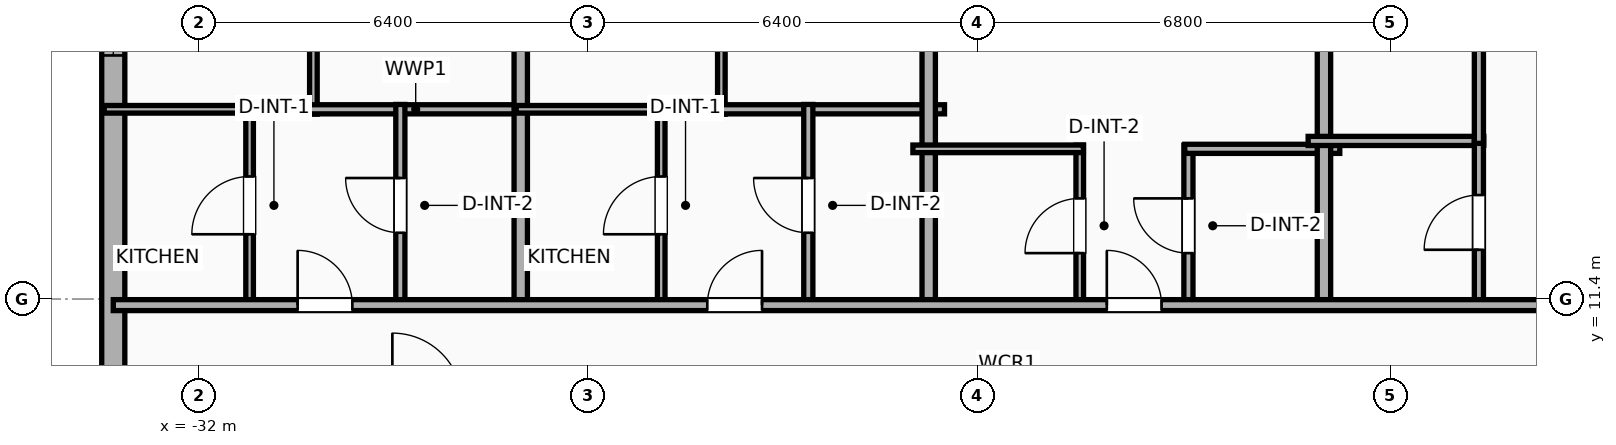
"""IFC4 building model, lengths in metres.
Left out: names, types, materials, properties, quantities, classifications, styles, units other than length and angle.
Written with IfcOpenShell. Run it as: python <this file> out.ifc"""

import sys

from ifc_helpers import new_model, si_unit, direction, frame, frame_2d, origin, place, context, subcontext, project, spatial, rectangle, extrude, element, fill, save


model = new_model("IFC4")
c1 = context("Model", 3, precision=1e-05, world=origin(), true_north=direction((0.0, 1.0)))
c2 = subcontext(c1, "Body", "Model", "MODEL_VIEW")
j1 = project(units=[si_unit("LENGTHUNIT", "METRE"), si_unit("PLANEANGLEUNIT", "RADIAN")], contexts=[c1])
p1 = place(None, origin())
s1 = spatial("IfcSite", under=j1, at=p1, CompositionType="ELEMENT")
p2 = place(p1, origin())
s2 = spatial("IfcBuilding", under=s1, at=p2, CompositionType="ELEMENT")
p3 = place(p2, frame((0.0, 0.0, 49.4)))
s3 = spatial("IfcBuildingStorey", under=s2, at=p3, CompositionType="ELEMENT", Elevation=49.4)
p4 = place(p3, frame((-33.41, -18.381, 0.0), z_axis=(0.0, 0.0, 1.0), x_axis=(0.0, 1.0, 0.0)))
e1 = element("IfcWall", 1, at=p4, inside=s3, PredefinedType="ELEMENTEDWALL", context=c2, shape_type="SweptSolid", body=[
    extrude(rectangle(XDim=36.763, YDim=0.38, at=frame_2d((18.381, 0.0))), origin(), (0.0, 0.0, 1.0), 3.65),
])
p5 = place(p4, frame((33.787, 0.0, 0.75)))
e2 = element("IfcOpeningElement", 2, at=p5, cuts=e1, PredefinedType="OPENING", context=c2, shape_type="SweptSolid", body=[
    extrude(rectangle(XDim=1.2, YDim=2.05, at=frame_2d((0.6, 1.025))), frame((0.0, 0.2, 0.0), z_axis=(0.0, -1.0, 0.0), x_axis=(1.0, 0.0, 0.0)), (0.0, 0.0, 1.0), 0.4),
])
p6 = place(p4, frame((22.726, 0.0, 0.75)))
e3 = element("IfcOpeningElement", 3, at=p6, cuts=e1, PredefinedType="OPENING", context=c2, shape_type="SweptSolid", body=[
    extrude(rectangle(XDim=1.2, YDim=2.05, at=frame_2d((0.6, 1.025))), frame((0.0, 0.2, 0.0), z_axis=(0.0, -1.0, 0.0), x_axis=(1.0, 0.0, 0.0)), (0.0, 0.0, 1.0), 0.4),
])
p7 = place(p4, frame((12.976, 0.0, 0.75)))
e4 = element("IfcOpeningElement", 4, at=p7, cuts=e1, PredefinedType="OPENING", context=c2, shape_type="SweptSolid", body=[
    extrude(rectangle(XDim=1.2, YDim=2.05, at=frame_2d((0.6, 1.025))), frame((0.0, 0.2, 0.0), z_axis=(0.0, -1.0, 0.0), x_axis=(1.0, 0.0, 0.0)), (0.0, 0.0, 1.0), 0.4),
])
p8 = place(p3, frame((-30.119, 14.44, 0.0), z_axis=(0.0, 0.0, 1.0), x_axis=(0.0, 1.0, 0.0)))
e5 = element("IfcWall", 5, at=p8, inside=s3, PredefinedType="PARTITIONING", context=c2, shape_type="SweptSolid", body=[
    extrude(rectangle(XDim=7.816, YDim=0.125, at=frame_2d((3.908, 0.0))), origin(), (0.0, 0.0, 1.0), 3.65),
])
p9 = place(p8, frame((1.426, 0.0, 0.0)))
e6 = element("IfcOpeningElement", 6, at=p9, cuts=e5, PredefinedType="OPENING", context=c2, shape_type="SweptSolid", body=[
    extrude(rectangle(XDim=0.9, YDim=2.05, at=frame_2d((0.45, 1.025))), frame((0.0, 0.073, 0.0), z_axis=(0.0, -1.0, 0.0), x_axis=(1.0, 0.0, 0.0)), (0.0, 0.0, 1.0), 0.145),
])
p10 = place(p3, frame((-30.239, 14.52, 0.0), z_axis=(0.0, 0.0, 1.0), x_axis=(1.0, 0.0, 0.0)))
e7 = element("IfcWall", 7, at=p10, inside=s3, PredefinedType="PLUMBINGWALL", context=c2, shape_type="SweptSolid", body=[
    extrude(rectangle(XDim=3.605, YDim=0.15, at=frame_2d((1.802, 0.0))), origin(), (0.0, 0.0, 1.0), 3.65),
])
p11 = place(p3, frame((-31.168, 11.28, 0.0), z_axis=(0.0, 0.0, 1.0), x_axis=(0.0, 1.0, 0.0)))
e8 = element("IfcWall", 8, at=p11, inside=s3, PredefinedType="PARTITIONING", context=c2, shape_type="SweptSolid", body=[
    extrude(rectangle(XDim=3.32, YDim=0.125, at=frame_2d((1.66, 0.0))), origin(), (0.0, 0.0, 1.0), 3.65),
])
p12 = place(p11, frame((1.185, 0.0, 0.0)))
e9 = element("IfcOpeningElement", 9, at=p12, cuts=e8, PredefinedType="OPENING", context=c2, shape_type="SweptSolid", body=[
    extrude(rectangle(XDim=0.95, YDim=2.05, at=frame_2d((0.475, 1.025))), frame((0.0, 0.073, 0.0), z_axis=(0.0, -1.0, 0.0), x_axis=(1.0, 0.0, 0.0)), (0.0, 0.0, 1.0), 0.145),
])
p13 = place(p3, frame((-33.56, 14.52, 0.0), z_axis=(0.0, 0.0, 1.0), x_axis=(1.0, 0.0, 0.0)))
e10 = element("IfcWall", 10, at=p13, inside=s3, PredefinedType="PARTITIONING", context=c2, shape_type="SweptSolid", body=[
    extrude(rectangle(XDim=2.512, YDim=0.125, at=frame_2d((1.256, 0.0))), origin(), (0.0, 0.0, 1.0), 3.65),
])
p14 = place(p3, frame((-28.689, 11.28, 0.0), z_axis=(0.0, 0.0, 1.0), x_axis=(0.0, 1.0, 0.0)))
e11 = element("IfcWall", 11, at=p14, inside=s3, PredefinedType="PLUMBINGWALL", context=c2, shape_type="SweptSolid", body=[
    extrude(rectangle(XDim=3.32, YDim=0.15, at=frame_2d((1.66, 0.0))), origin(), (0.0, 0.0, 1.0), 3.65),
])
p15 = place(p14, frame((1.21, 0.0, 0.0)))
e12 = element("IfcOpeningElement", 12, at=p15, cuts=e11, PredefinedType="OPENING", context=c2, shape_type="SweptSolid", body=[
    extrude(rectangle(XDim=0.9, YDim=2.05, at=frame_2d((0.45, 1.025))), frame((0.0, 0.085, 0.0), z_axis=(0.0, -1.0, 0.0), x_axis=(1.0, 0.0, 0.0)), (0.0, 0.0, 1.0), 0.17),
])
p16 = place(p3, frame((-26.709, 11.22, 0.0), z_axis=(0.0, 0.0, 1.0), x_axis=(0.0, 1.0, 0.0)))
e13 = element("IfcWall", 13, at=p16, inside=s3, PredefinedType="PARTITIONING", context=c2, shape_type="SweptSolid", body=[
    extrude(rectangle(XDim=10.99, YDim=0.22, at=frame_2d((5.495, 0.0))), origin(), (0.0, 0.0, 1.0), 3.65),
])
p17 = place(p3, frame((-23.41, 14.44, 0.0), z_axis=(0.0, 0.0, 1.0), x_axis=(0.0, 1.0, 0.0)))
e14 = element("IfcWall", 14, at=p17, inside=s3, PredefinedType="PARTITIONING", context=c2, shape_type="SweptSolid", body=[
    extrude(rectangle(XDim=7.92, YDim=0.125, at=frame_2d((3.96, 0.0))), origin(), (0.0, 0.0, 1.0), 3.65),
])
p18 = place(p17, frame((1.451, 0.0, 0.0)))
e15 = element("IfcOpeningElement", 15, at=p18, cuts=e14, PredefinedType="OPENING", context=c2, shape_type="SweptSolid", body=[
    extrude(rectangle(XDim=0.9, YDim=2.05, at=frame_2d((0.45, 1.025))), frame((0.0, 0.073, 0.0), z_axis=(0.0, -1.0, 0.0), x_axis=(1.0, 0.0, 0.0)), (0.0, 0.0, 1.0), 0.145),
])
p19 = place(p3, frame((-23.53, 14.52, 0.0), z_axis=(0.0, 0.0, 1.0), x_axis=(1.0, 0.0, 0.0)))
e16 = element("IfcWall", 16, at=p19, inside=s3, PredefinedType="PLUMBINGWALL", context=c2, shape_type="SweptSolid", body=[
    extrude(rectangle(XDim=3.79, YDim=0.15, at=frame_2d((1.895, 0.0))), origin(), (0.0, 0.0, 1.0), 3.65),
])
p20 = place(p3, frame((-24.399, 11.28, 0.0), z_axis=(0.0, 0.0, 1.0), x_axis=(0.0, 1.0, 0.0)))
e17 = element("IfcWall", 17, at=p20, inside=s3, PredefinedType="PARTITIONING", context=c2, shape_type="SweptSolid", body=[
    extrude(rectangle(XDim=3.32, YDim=0.125, at=frame_2d((1.66, 0.0))), origin(), (0.0, 0.0, 1.0), 3.65),
])
p21 = place(p20, frame((1.185, 0.0, 0.0)))
e18 = element("IfcOpeningElement", 18, at=p21, cuts=e17, PredefinedType="OPENING", context=c2, shape_type="SweptSolid", body=[
    extrude(rectangle(XDim=0.95, YDim=2.05, at=frame_2d((0.475, 1.025))), frame((0.0, 0.073, 0.0), z_axis=(0.0, -1.0, 0.0), x_axis=(1.0, 0.0, 0.0)), (0.0, 0.0, 1.0), 0.145),
])
p22 = place(p3, frame((-26.784, 14.52, 0.0), z_axis=(0.0, 0.0, 1.0), x_axis=(1.0, 0.0, 0.0)))
e19 = element("IfcWall", 19, at=p22, inside=s3, PredefinedType="PARTITIONING", context=c2, shape_type="SweptSolid", body=[
    extrude(rectangle(XDim=2.505, YDim=0.125, at=frame_2d((1.252, 0.0))), origin(), (0.0, 0.0, 1.0), 3.65),
])
p23 = place(p3, frame((-21.98, 11.28, 0.0), z_axis=(0.0, 0.0, 1.0), x_axis=(0.0, 1.0, 0.0)))
e20 = element("IfcWall", 20, at=p23, inside=s3, PredefinedType="PLUMBINGWALL", context=c2, shape_type="SweptSolid", body=[
    extrude(rectangle(XDim=3.32, YDim=0.15, at=frame_2d((1.66, 0.0))), origin(), (0.0, 0.0, 1.0), 3.65),
])
p24 = place(p23, frame((1.21, 0.0, 0.0)))
e21 = element("IfcOpeningElement", 21, at=p24, cuts=e20, PredefinedType="OPENING", context=c2, shape_type="SweptSolid", body=[
    extrude(rectangle(XDim=0.9, YDim=2.05, at=frame_2d((0.45, 1.025))), frame((0.0, 0.085, 0.0), z_axis=(0.0, -1.0, 0.0), x_axis=(1.0, 0.0, 0.0)), (0.0, 0.0, 1.0), 0.17),
])
p25 = place(p3, frame((-20.0, 11.22, 0.0), z_axis=(0.0, 0.0, 1.0), x_axis=(0.0, 1.0, 0.0)))
e22 = element("IfcWall", 22, at=p25, inside=s3, PredefinedType="PARTITIONING", context=c2, shape_type="SweptSolid", body=[
    extrude(rectangle(XDim=10.99, YDim=0.22, at=frame_2d((5.495, 0.0))), origin(), (0.0, 0.0, 1.0), 3.65),
])
p26 = place(p3, frame((-17.516, 11.28, 0.0), z_axis=(0.0, 0.0, 1.0), x_axis=(0.0, 1.0, 0.0)))
e23 = element("IfcWall", 23, at=p26, inside=s3, PredefinedType="PARTITIONING", context=c2, shape_type="SweptSolid", body=[
    extrude(rectangle(XDim=2.65, YDim=0.125, at=frame_2d((1.325, 0.0))), origin(), (0.0, 0.0, 1.0), 3.65),
])
p27 = place(p26, frame((0.875, 0.0, 0.0)))
e24 = element("IfcOpeningElement", 24, at=p27, cuts=e23, PredefinedType="OPENING", context=c2, shape_type="SweptSolid", body=[
    extrude(rectangle(XDim=0.9, YDim=2.05, at=frame_2d((0.45, 1.025))), frame((0.0, 0.073, 0.0), z_axis=(0.0, -1.0, 0.0), x_axis=(1.0, 0.0, 0.0)), (0.0, 0.0, 1.0), 0.145),
])
p28 = place(p3, frame((-15.729, 11.28, 0.0), z_axis=(0.0, 0.0, 1.0), x_axis=(0.0, 1.0, 0.0)))
e25 = element("IfcWall", 25, at=p28, inside=s3, PredefinedType="PLUMBINGWALL", context=c2, shape_type="SweptSolid", body=[
    extrude(rectangle(XDim=2.65, YDim=0.15, at=frame_2d((1.325, 0.0))), origin(), (0.0, 0.0, 1.0), 3.65),
])
p29 = place(p28, frame((0.875, 0.0, 0.0)))
e26 = element("IfcOpeningElement", 26, at=p29, cuts=e25, PredefinedType="OPENING", context=c2, shape_type="SweptSolid", body=[
    extrude(rectangle(XDim=0.9, YDim=2.05, at=frame_2d((0.45, 1.025))), frame((0.0, 0.085, 0.0), z_axis=(0.0, -1.0, 0.0), x_axis=(1.0, 0.0, 0.0)), (0.0, 0.0, 1.0), 0.17),
])
p30 = place(p3, frame((-20.26, 13.87, 0.0), z_axis=(0.0, 0.0, 1.0), x_axis=(1.0, 0.0, 0.0)))
e27 = element("IfcWall", 27, at=p30, inside=s3, PredefinedType="PARTITIONING", context=c2, shape_type="SweptSolid", body=[
    extrude(rectangle(XDim=2.804, YDim=0.125, at=frame_2d((1.402, 0.0))), origin(), (0.0, 0.0, 1.0), 3.65),
])
p31 = place(p3, frame((-15.789, 13.87, 0.0), z_axis=(0.0, 0.0, 1.0), x_axis=(1.0, 0.0, 0.0)))
e28 = element("IfcWall", 28, at=p31, inside=s3, PredefinedType="PLUMBINGWALL", context=c2, shape_type="SweptSolid", body=[
    extrude(rectangle(XDim=2.549, YDim=0.15, at=frame_2d((1.274, 0.0))), origin(), (0.0, 0.0, 1.0), 3.65),
])
p32 = place(p3, frame((-13.5, 11.22, 0.0), z_axis=(0.0, 0.0, 1.0), x_axis=(0.0, 1.0, 0.0)))
e29 = element("IfcWall", 29, at=p32, inside=s3, PredefinedType="PARTITIONING", context=c2, shape_type="SweptSolid", body=[
    extrude(rectangle(XDim=10.99, YDim=0.22, at=frame_2d((5.495, 0.0))), origin(), (0.0, 0.0, 1.0), 3.65),
])
p33 = place(p3, frame((-13.76, 14.0, 0.0), z_axis=(0.0, 0.0, 1.0), x_axis=(1.0, 0.0, 0.0)))
e30 = element("IfcWall", 30, at=p33, inside=s3, PredefinedType="PLUMBINGWALL", context=c2, shape_type="SweptSolid", body=[
    extrude(rectangle(XDim=2.888, YDim=0.15, at=frame_2d((1.444, 0.0))), origin(), (0.0, 0.0, 1.0), 3.65),
])
p34 = place(p3, frame((-10.952, 11.28, 0.0), z_axis=(0.0, 0.0, 1.0), x_axis=(0.0, 1.0, 0.0)))
e31 = element("IfcWall", 31, at=p34, inside=s3, PredefinedType="PLUMBINGWALL", context=c2, shape_type="SweptSolid", body=[
    extrude(rectangle(XDim=2.76, YDim=0.15, at=frame_2d((1.38, 0.0))), origin(), (0.0, 0.0, 1.0), 2.94),
])
p35 = place(p34, frame((0.93, 0.0, 0.0)))
e32 = element("IfcOpeningElement", 32, at=p35, cuts=e31, PredefinedType="OPENING", context=c2, shape_type="SweptSolid", body=[
    extrude(rectangle(XDim=0.9, YDim=2.05, at=frame_2d((0.45, 1.025))), frame((0.0, 0.085, 0.0), z_axis=(0.0, -1.0, 0.0), x_axis=(1.0, 0.0, 0.0)), (0.0, 0.0, 1.0), 0.17),
])
p36 = place(p3, frame((-10.952, 13.96, 0.0), z_axis=(0.0, 0.0, 1.0), x_axis=(0.0, 1.0, 0.0)))
e33 = element("IfcWall", 33, at=p36, inside=s3, PredefinedType="PLUMBINGWALL", context=c2, shape_type="SweptSolid", body=[
    extrude(rectangle(XDim=8.298, YDim=0.15, at=frame_2d((4.149, 0.0))), origin(), (0.0, 0.0, 1.0), 3.65),
])
p37 = place(p36, frame((3.699, 0.0, 0.0)))
e34 = element("IfcOpeningElement", 34, at=p37, cuts=e33, PredefinedType="OPENING", context=c2, shape_type="SweptSolid", body=[
    extrude(rectangle(XDim=0.9, YDim=2.05, at=frame_2d((0.45, 1.025))), frame((0.0, 0.085, 0.0), z_axis=(0.0, -1.0, 0.0), x_axis=(1.0, 0.0, 0.0)), (0.0, 0.0, 1.0), 0.17),
])
p38 = place(p3, frame((-33.41, 11.3, 0.0), z_axis=(0.0, 0.0, 1.0), x_axis=(1.0, 0.0, 0.0)))
e35 = element("IfcWall", 35, at=p38, inside=s3, PredefinedType="PARTITIONING", context=c2, shape_type="SweptSolid", body=[
    extrude(rectangle(XDim=59.62, YDim=0.18, at=frame_2d((29.81, 0.0))), origin(), (0.0, 0.0, 1.0), 3.65),
])
p39 = place(p38, frame((3.032, 0.0, 0.0)))
e36 = element("IfcOpeningElement", 36, at=p39, cuts=e35, PredefinedType="OPENING", context=c2, shape_type="SweptSolid", body=[
    extrude(rectangle(XDim=0.9, YDim=2.05, at=frame_2d((0.45, 1.025))), frame((0.0, 0.1, 0.0), z_axis=(0.0, -1.0, 0.0), x_axis=(1.0, 0.0, 0.0)), (0.0, 0.0, 1.0), 0.2),
])
p40 = place(p38, frame((9.769, 0.0, 0.0)))
e37 = element("IfcOpeningElement", 37, at=p40, cuts=e35, PredefinedType="OPENING", context=c2, shape_type="SweptSolid", body=[
    extrude(rectangle(XDim=0.9, YDim=2.05, at=frame_2d((0.45, 1.025))), frame((0.0, 0.1, 0.0), z_axis=(0.0, -1.0, 0.0), x_axis=(1.0, 0.0, 0.0)), (0.0, 0.0, 1.0), 0.2),
])
p41 = place(p38, frame((16.339, 0.0, 0.0)))
e38 = element("IfcOpeningElement", 38, at=p41, cuts=e35, PredefinedType="OPENING", context=c2, shape_type="SweptSolid", body=[
    extrude(rectangle(XDim=0.9, YDim=2.05, at=frame_2d((0.45, 1.025))), frame((0.0, 0.1, 0.0), z_axis=(0.0, -1.0, 0.0), x_axis=(1.0, 0.0, 0.0)), (0.0, 0.0, 1.0), 0.2),
])
p42 = place(p38, frame((23.827, 0.0, 0.0)))
e39 = element("IfcOpeningElement", 39, at=p42, cuts=e35, PredefinedType="OPENING", context=c2, shape_type="SweptSolid", body=[
    extrude(rectangle(XDim=1.15, YDim=2.05, at=frame_2d((0.575, 1.025))), frame((0.0, 0.1, 0.0), z_axis=(0.0, -1.0, 0.0), x_axis=(1.0, 0.0, 0.0)), (0.0, 0.0, 1.0), 0.2),
])
p43 = place(p38, frame((29.622, 0.0, 0.0)))
e40 = element("IfcOpeningElement", 40, at=p43, cuts=e35, PredefinedType="OPENING", context=c2, shape_type="SweptSolid", body=[
    extrude(rectangle(XDim=0.9, YDim=2.05, at=frame_2d((0.45, 1.025))), frame((0.0, 0.1, 0.0), z_axis=(0.0, -1.0, 0.0), x_axis=(1.0, 0.0, 0.0)), (0.0, 0.0, 1.0), 0.2),
])
p44 = place(p38, frame((36.628, 0.0, 0.0)))
e41 = element("IfcOpeningElement", 41, at=p44, cuts=e35, PredefinedType="OPENING", context=c2, shape_type="SweptSolid", body=[
    extrude(rectangle(XDim=0.9, YDim=2.05, at=frame_2d((0.45, 1.025))), frame((0.0, 0.1, 0.0), z_axis=(0.0, -1.0, 0.0), x_axis=(1.0, 0.0, 0.0)), (0.0, 0.0, 1.0), 0.2),
])
p45 = place(p38, frame((43.335, 0.0, 0.0)))
e42 = element("IfcOpeningElement", 42, at=p45, cuts=e35, PredefinedType="OPENING", context=c2, shape_type="SweptSolid", body=[
    extrude(rectangle(XDim=0.9, YDim=2.05, at=frame_2d((0.45, 1.025))), frame((0.0, 0.1, 0.0), z_axis=(0.0, -1.0, 0.0), x_axis=(1.0, 0.0, 0.0)), (0.0, 0.0, 1.0), 0.2),
])
p46 = place(p38, frame((48.307, 0.0, 0.0)))
e43 = element("IfcOpeningElement", 43, at=p46, cuts=e35, PredefinedType="OPENING", context=c2, shape_type="SweptSolid", body=[
    extrude(rectangle(XDim=1.15, YDim=2.05, at=frame_2d((0.575, 1.025))), frame((0.0, 0.1, 0.0), z_axis=(0.0, -1.0, 0.0), x_axis=(1.0, 0.0, 0.0)), (0.0, 0.0, 1.0), 0.2),
])
p47 = place(p38, frame((56.225, 0.0, 0.0)))
e44 = element("IfcOpeningElement", 44, at=p47, cuts=e35, PredefinedType="OPENING", context=c2, shape_type="SweptSolid", body=[
    extrude(rectangle(XDim=0.9, YDim=2.05, at=frame_2d((0.45, 1.025))), frame((0.0, 0.1, 0.0), z_axis=(0.0, -1.0, 0.0), x_axis=(1.0, 0.0, 0.0)), (0.0, 0.0, 1.0), 0.2),
])
p48 = place(p5, origin())
e45 = element("IfcWindow", 45, at=p48, inside=s3, PartitioningType="SINGLE_PANEL", PredefinedType="WINDOW", context=c2, shape_type="SweptSolid", body=[
    extrude(rectangle(XDim=1.2, YDim=2.05, at=frame_2d((0.6, 1.025))), frame((0.0, 0.03, 0.0), z_axis=(0.0, -1.0, 0.0), x_axis=(1.0, 0.0, 0.0)), (0.0, 0.0, 1.0), 0.06),
])
fill(e2, e45)
p49 = place(p12, origin())
e46 = element("IfcDoor", 46, at=p49, inside=s3, OperationType="SINGLE_SWING_LEFT", PredefinedType="DOOR", context=c2, shape_type="SweptSolid", body=[
    extrude(rectangle(XDim=0.95, YDim=2.05, at=frame_2d((0.475, 1.025))), frame((0.0, 0.025, 0.0), z_axis=(0.0, -1.0, 0.0), x_axis=(1.0, 0.0, 0.0)), (0.0, 0.0, 1.0), 0.05),
])
fill(e9, e46)
p50 = place(p15, origin())
e47 = element("IfcDoor", 47, at=p50, inside=s3, OperationType="SINGLE_SWING_RIGHT", PredefinedType="DOOR", context=c2, shape_type="SweptSolid", body=[
    extrude(rectangle(XDim=0.9, YDim=2.05, at=frame_2d((0.45, 1.025))), frame((0.0, 0.025, 0.0), z_axis=(0.0, -1.0, 0.0), x_axis=(1.0, 0.0, 0.0)), (0.0, 0.0, 1.0), 0.05),
])
fill(e12, e47)
p51 = place(p21, origin())
e48 = element("IfcDoor", 48, at=p51, inside=s3, OperationType="SINGLE_SWING_LEFT", PredefinedType="DOOR", context=c2, shape_type="SweptSolid", body=[
    extrude(rectangle(XDim=0.95, YDim=2.05, at=frame_2d((0.475, 1.025))), frame((0.0, 0.025, 0.0), z_axis=(0.0, -1.0, 0.0), x_axis=(1.0, 0.0, 0.0)), (0.0, 0.0, 1.0), 0.05),
])
fill(e18, e48)
p52 = place(p24, origin())
e49 = element("IfcDoor", 49, at=p52, inside=s3, OperationType="SINGLE_SWING_RIGHT", PredefinedType="DOOR", context=c2, shape_type="SweptSolid", body=[
    extrude(rectangle(XDim=0.9, YDim=2.05, at=frame_2d((0.45, 1.025))), frame((0.0, 0.025, 0.0), z_axis=(0.0, -1.0, 0.0), x_axis=(1.0, 0.0, 0.0)), (0.0, 0.0, 1.0), 0.05),
])
fill(e21, e49)
p53 = place(p27, origin())
e50 = element("IfcDoor", 50, at=p53, inside=s3, OperationType="SINGLE_SWING_LEFT", PredefinedType="DOOR", context=c2, shape_type="SweptSolid", body=[
    extrude(rectangle(XDim=0.9, YDim=2.05, at=frame_2d((0.45, 1.025))), frame((0.0, 0.025, 0.0), z_axis=(0.0, -1.0, 0.0), x_axis=(1.0, 0.0, 0.0)), (0.0, 0.0, 1.0), 0.05),
])
fill(e24, e50)
p54 = place(p29, origin())
e51 = element("IfcDoor", 51, at=p54, inside=s3, OperationType="SINGLE_SWING_RIGHT", PredefinedType="DOOR", context=c2, shape_type="SweptSolid", body=[
    extrude(rectangle(XDim=0.9, YDim=2.05, at=frame_2d((0.45, 1.025))), frame((0.0, 0.025, 0.0), z_axis=(0.0, -1.0, 0.0), x_axis=(1.0, 0.0, 0.0)), (0.0, 0.0, 1.0), 0.05),
])
fill(e26, e51)
p55 = place(p35, origin())
e52 = element("IfcDoor", 52, at=p55, inside=s3, OperationType="SINGLE_SWING_LEFT", PredefinedType="DOOR", context=c2, shape_type="SweptSolid", body=[
    extrude(rectangle(XDim=0.9, YDim=2.05, at=frame_2d((0.45, 1.025))), frame((0.0, 0.025, 0.0), z_axis=(0.0, -1.0, 0.0), x_axis=(1.0, 0.0, 0.0)), (0.0, 0.0, 1.0), 0.05),
])
fill(e32, e52)
p56 = place(p39, origin())
e53 = element("IfcDoor", 53, at=p56, inside=s3, OperationType="SINGLE_SWING_LEFT", PredefinedType="DOOR", context=c2, shape_type="SweptSolid", body=[
    extrude(rectangle(XDim=0.9, YDim=2.05, at=frame_2d((0.45, 1.025))), frame((0.0, 0.025, 0.0), z_axis=(0.0, -1.0, 0.0), x_axis=(1.0, 0.0, 0.0)), (0.0, 0.0, 1.0), 0.05),
])
fill(e36, e53)
p57 = place(p40, origin())
e54 = element("IfcDoor", 54, at=p57, inside=s3, OperationType="SINGLE_SWING_RIGHT", PredefinedType="DOOR", context=c2, shape_type="SweptSolid", body=[
    extrude(rectangle(XDim=0.9, YDim=2.05, at=frame_2d((0.45, 1.025))), frame((0.0, 0.025, 0.0), z_axis=(0.0, -1.0, 0.0), x_axis=(1.0, 0.0, 0.0)), (0.0, 0.0, 1.0), 0.05),
])
fill(e37, e54)
p58 = place(p41, origin())
e55 = element("IfcDoor", 55, at=p58, inside=s3, OperationType="SINGLE_SWING_LEFT", PredefinedType="DOOR", context=c2, shape_type="SweptSolid", body=[
    extrude(rectangle(XDim=0.9, YDim=2.05, at=frame_2d((0.45, 1.025))), frame((0.0, 0.025, 0.0), z_axis=(0.0, -1.0, 0.0), x_axis=(1.0, 0.0, 0.0)), (0.0, 0.0, 1.0), 0.05),
])
fill(e38, e55)
save(model, sys.argv[1])
